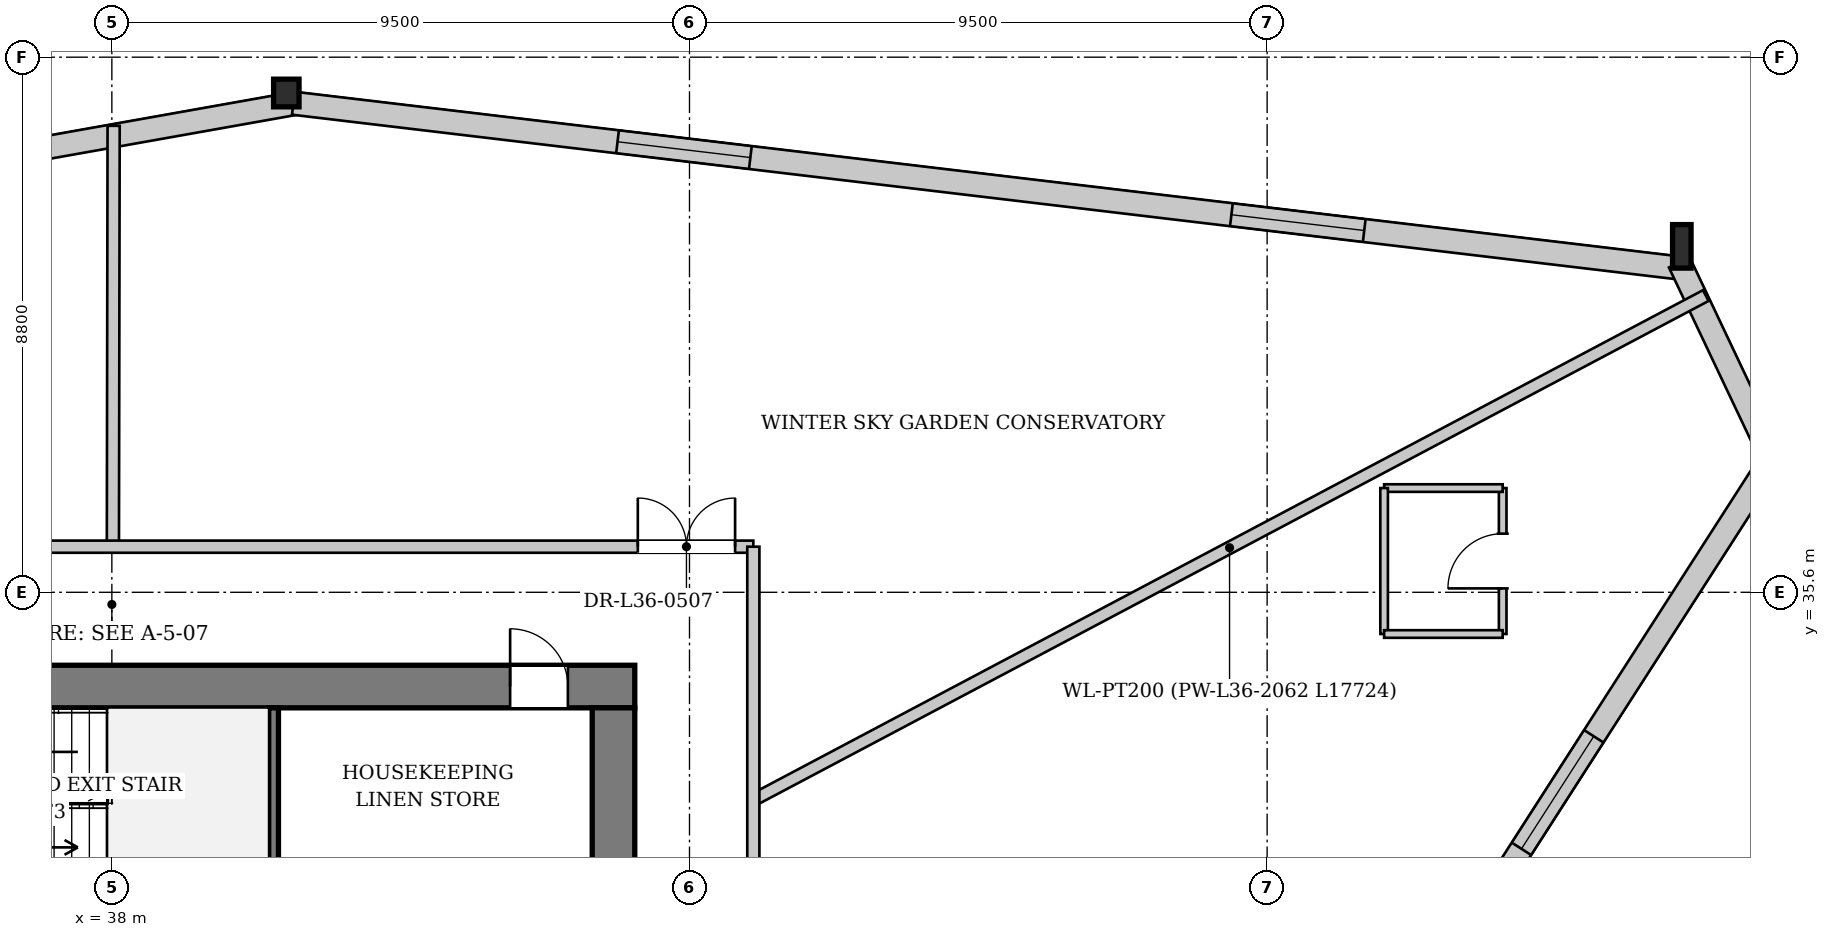
"""IFC4 building model, lengths in metres.
Left out: names, types, materials, properties, quantities, classifications, styles, units other than length and angle.
Written with IfcOpenShell. Run it as: python <this file> out.ifc"""

import sys

from ifc_helpers import new_model, si_unit, direction, frame, frame_2d, origin, origin_2d, place, context, subcontext, project, spatial, rectangle, i_section, extrude, source, transform, mapped, element, fill, save


model = new_model("IFC4")
c1 = context("Model", 3, precision=1e-05, world=origin(), true_north=direction((0.0, 1.0)))
c2 = subcontext(c1, "Body", "Model", "MODEL_VIEW")
j1 = project(units=[si_unit("LENGTHUNIT", "METRE"), si_unit("PLANEANGLEUNIT", "RADIAN")], contexts=[c1])
p1 = place(None, origin())
s1 = spatial("IfcSite", under=j1, at=p1, CompositionType="ELEMENT")
p2 = place(p1, origin())
s2 = spatial("IfcBuilding", under=s1, at=p2, CompositionType="ELEMENT")
p3 = place(p2, frame((0.0, 0.0, 138.1)))
s3 = spatial("IfcBuildingStorey", under=s2, at=p3, CompositionType="ELEMENT", Elevation=138.1)
m1 = source(origin(), c2, "Body", "SweptSolid", [
    extrude(i_section(OverallWidth=0.304, OverallDepth=0.716, WebThickness=0.021, FlangeThickness=0.04, at=origin_2d()), origin(), (0.0, 0.0, 1.0), 3.862),
])
p4 = place(p3, frame((63.951, 41.104, 0.0), z_axis=(-0.067901574351, 0.09553005479, 0.993107942186), x_axis=(-0.815079857812, -0.579348621634, 0.0)))
e1 = element("IfcColumn", 1, at=p4, inside=s3, PredefinedType="COLUMN", context=c2, shape_type="MappedRepresentation", body=[
    mapped(m1, transform((0.0, 0.0, 0.0), x_axis=(1.0, 0.0, 0.0), y_axis=(0.0, 1.0, 0.0), z_axis=(0.0, 0.0, 1.0), scale=1.0)),
])
m2 = source(origin(), c2, "Body", "SweptSolid", [
    extrude(i_section(OverallWidth=0.418, OverallDepth=0.455, WebThickness=0.038, FlangeThickness=0.059, at=origin_2d()), origin(), (0.0, 0.0, 1.0), 3.845),
])
p5 = place(p3, frame((41.007, 43.832, 0.0), z_axis=(-0.071811479916, -0.010730451022, 0.997360500909), x_axis=(0.147784535061, -0.989019580795, 0.0)))
e2 = element("IfcColumn", 2, at=p5, inside=s3, PredefinedType="COLUMN", context=c2, shape_type="MappedRepresentation", body=[
    mapped(m2, transform((0.0, 0.0, 0.0), x_axis=(1.0, 0.0, 0.0), y_axis=(0.0, 1.0, 0.0), z_axis=(0.0, 0.0, 1.0), scale=1.0)),
])
p6 = place(p3, frame((18.292, 39.598, 0.0), z_axis=(0.0, 0.0, 1.0), x_axis=(0.98454939434, 0.175107081823, 0.0)))
e3 = element("IfcWall", 3, at=p6, inside=s3, PredefinedType="SOLIDWALL", context=c2, shape_type="SweptSolid", body=[
    extrude(rectangle(XDim=23.105, YDim=0.38, at=frame_2d((11.553, 0.0))), origin(), (0.0, 0.0, 1.0), 2.972),
])
p7 = place(p6, frame((5.369, 0.0, 0.602)))
e4 = element("IfcOpeningElement", 4, at=p7, cuts=e3, PredefinedType="OPENING", context=c2, shape_type="SweptSolid", body=[
    extrude(rectangle(XDim=2.2, YDim=2.25, at=frame_2d((1.1, 1.125))), frame((0.0, 0.2, 0.0), z_axis=(0.0, -1.0, 0.0), x_axis=(1.0, 0.0, 0.0)), (0.0, 0.0, 1.0), 0.4),
])
p8 = place(p6, frame((15.536, 0.0, 0.602)))
e5 = element("IfcOpeningElement", 5, at=p8, cuts=e3, PredefinedType="OPENING", context=c2, shape_type="SweptSolid", body=[
    extrude(rectangle(XDim=2.2, YDim=2.25, at=frame_2d((1.1, 1.125))), frame((0.0, 0.2, 0.0), z_axis=(0.0, -1.0, 0.0), x_axis=(1.0, 0.0, 0.0)), (0.0, 0.0, 1.0), 0.4),
])
p9 = place(p3, frame((40.985, 43.643, 0.0), z_axis=(0.0, 0.0, 1.0), x_axis=(0.99301149666, -0.118017657578, 0.0)))
e6 = element("IfcWall", 6, at=p9, inside=s3, PredefinedType="SOLIDWALL", context=c2, shape_type="SweptSolid", body=[
    extrude(rectangle(XDim=23.105, YDim=0.38, at=frame_2d((11.552, 0.0))), origin(), (0.0, 0.0, 1.0), 2.972),
])
p10 = place(p9, frame((5.369, 0.0, 0.602)))
e7 = element("IfcOpeningElement", 7, at=p10, cuts=e6, PredefinedType="OPENING", context=c2, shape_type="SweptSolid", body=[
    extrude(rectangle(XDim=2.2, YDim=2.25, at=frame_2d((1.1, 1.125))), frame((0.0, 0.2, 0.0), z_axis=(0.0, -1.0, 0.0), x_axis=(1.0, 0.0, 0.0)), (0.0, 0.0, 1.0), 0.4),
])
p11 = place(p9, frame((15.536, 0.0, 0.602)))
e8 = element("IfcOpeningElement", 8, at=p11, cuts=e6, PredefinedType="OPENING", context=c2, shape_type="SweptSolid", body=[
    extrude(rectangle(XDim=2.2, YDim=2.25, at=frame_2d((1.1, 1.125))), frame((0.0, 0.2, 0.0), z_axis=(0.0, -1.0, 0.0), x_axis=(1.0, 0.0, 0.0)), (0.0, 0.0, 1.0), 0.4),
])
p12 = place(p3, frame((63.779, 41.023, 0.0), z_axis=(0.0, 0.0, 1.0), x_axis=(0.428160614976, -0.903702654518, 0.0)))
e9 = element("IfcWall", 9, at=p12, inside=s3, PredefinedType="SOLIDWALL", context=c2, shape_type="SweptSolid", body=[
    extrude(rectangle(XDim=3.674, YDim=0.38, at=frame_2d((1.837, 0.0))), origin(), (0.0, 0.0, 1.0), 2.972),
])
p13 = place(p3, frame((65.364, 37.887, 0.0), z_axis=(0.0, 0.0, 1.0), x_axis=(-0.540678429376, -0.84122935993, 0.0)))
e10 = element("IfcWall", 10, at=p13, inside=s3, PredefinedType="SOLIDWALL", context=c2, shape_type="SweptSolid", body=[
    extrude(rectangle(XDim=23.693, YDim=0.38, at=frame_2d((11.847, 0.0))), origin(), (0.0, 0.0, 1.0), 2.972),
])
p14 = place(p13, frame((5.534, 0.0, 0.602)))
e11 = element("IfcOpeningElement", 11, at=p14, cuts=e10, PredefinedType="OPENING", context=c2, shape_type="SweptSolid", body=[
    extrude(rectangle(XDim=2.2, YDim=2.25, at=frame_2d((1.1, 1.125))), frame((0.0, 0.2, 0.0), z_axis=(0.0, -1.0, 0.0), x_axis=(1.0, 0.0, 0.0)), (0.0, 0.0, 1.0), 0.4),
])
p15 = place(p13, frame((17.559, 0.0, 0.602)))
e12 = element("IfcOpeningElement", 12, at=p15, cuts=e10, PredefinedType="OPENING", context=c2, shape_type="SweptSolid", body=[
    extrude(rectangle(XDim=2.2, YDim=2.25, at=frame_2d((1.1, 1.125))), frame((0.0, 0.2, 0.0), z_axis=(0.0, -1.0, 0.0), x_axis=(1.0, 0.0, 0.0)), (0.0, 0.0, 1.0), 0.4),
])
p16 = place(p3, frame((29.4, 34.05, 0.0), z_axis=(0.0, 0.0, 1.0), x_axis=(1.0, 0.0, 0.0)))
e13 = element("IfcWall", 13, at=p16, inside=s3, PredefinedType="SHEAR", context=c2, shape_type="SweptSolid", body=[
    extrude(rectangle(XDim=17.2, YDim=0.7, at=frame_2d((8.6, 0.0))), origin(), (0.0, 0.0, 1.0), 3.58),
])
p17 = place(p16, frame((1.7, 0.0, 0.0)))
e14 = element("IfcOpeningElement", 14, at=p17, cuts=e13, PredefinedType="OPENING", context=c2, shape_type="SweptSolid", body=[
    extrude(rectangle(XDim=0.95, YDim=2.1, at=frame_2d((0.475, 1.05))), frame((0.0, 0.36, 0.0), z_axis=(0.0, -1.0, 0.0), x_axis=(1.0, 0.0, 0.0)), (0.0, 0.0, 1.0), 0.72),
])
p18 = place(p16, frame((4.08, 0.0, 0.0)))
e15 = element("IfcOpeningElement", 15, at=p18, cuts=e13, PredefinedType="OPENING", context=c2, shape_type="SweptSolid", body=[
    extrude(rectangle(XDim=1.32, YDim=2.2, at=frame_2d((0.66, 1.1))), frame((0.0, 0.36, 0.0), z_axis=(0.0, -1.0, 0.0), x_axis=(1.0, 0.0, 0.0)), (0.0, 0.0, 1.0), 0.72),
])
p19 = place(p16, frame((15.15, 0.0, 0.0)))
e16 = element("IfcOpeningElement", 16, at=p19, cuts=e13, PredefinedType="OPENING", context=c2, shape_type="SweptSolid", body=[
    extrude(rectangle(XDim=0.95, YDim=2.1, at=frame_2d((0.475, 1.05))), frame((0.0, 0.36, 0.0), z_axis=(0.0, -1.0, 0.0), x_axis=(1.0, 0.0, 0.0)), (0.0, 0.0, 1.0), 0.72),
])
p20 = place(p3, frame((46.25, 33.7, 0.0), z_axis=(0.0, 0.0, 1.0), x_axis=(0.0, -1.0, 0.0)))
e17 = element("IfcWall", 17, at=p20, inside=s3, PredefinedType="SHEAR", context=c2, shape_type="SweptSolid", body=[
    extrude(rectangle(XDim=14.2, YDim=0.7, at=frame_2d((7.1, 0.0))), origin(), (0.0, 0.0, 1.0), 3.58),
])
p21 = place(p20, frame((5.18, 0.0, 0.0)))
e18 = element("IfcOpeningElement", 18, at=p21, cuts=e17, PredefinedType="OPENING", context=c2, shape_type="SweptSolid", body=[
    extrude(rectangle(XDim=1.6, YDim=2.2, at=frame_2d((0.8, 1.1))), frame((0.0, 0.36, 0.0), z_axis=(0.0, -1.0, 0.0), x_axis=(1.0, 0.0, 0.0)), (0.0, 0.0, 1.0), 0.72),
])
p22 = place(p3, frame((40.66, 30.6, 0.0), z_axis=(0.0, 0.0, 1.0), x_axis=(0.0, 1.0, 0.0)))
e19 = element("IfcWall", 19, at=p22, inside=s3, PredefinedType="PARTITIONING", context=c2, shape_type="SweptSolid", body=[
    extrude(rectangle(XDim=3.1, YDim=0.16, at=frame_2d((1.55, 0.0))), origin(), (0.0, 0.0, 1.0), 3.58),
])
p23 = place(p3, frame((48.55, 32.186, 0.0), z_axis=(0.0, 0.0, 1.0), x_axis=(0.883765466782, 0.467930122694, 0.0)))
e20 = element("IfcWall", 20, at=p23, inside=s3, PredefinedType="PARTITIONING", context=c2, shape_type="SweptSolid", body=[
    extrude(rectangle(XDim=17.724, YDim=0.2, at=frame_2d((8.862, 0.0))), origin(), (0.0, 0.0, 1.0), 3.58),
])
p24 = place(p3, frame((38.017, 36.35, 0.0), z_axis=(0.0, 0.0, 1.0), x_axis=(0.001728453448, 0.999998506223, 0.0)))
e21 = element("IfcWall", 21, at=p24, inside=s3, PredefinedType="PARTITIONING", context=c2, shape_type="SweptSolid", body=[
    extrude(rectangle(XDim=6.921, YDim=0.2, at=frame_2d((3.46, 0.0))), origin(), (0.0, 0.0, 1.0), 3.58),
])
p25 = place(p3, frame((60.874, 34.914, 0.0), z_axis=(0.0, 0.0, 1.0), x_axis=(0.0, 1.0, 0.0)))
e22 = element("IfcWall", 22, at=p25, inside=s3, PredefinedType="PARTITIONING", context=c2, shape_type="SweptSolid", body=[
    extrude(rectangle(XDim=2.4, YDim=0.125, at=frame_2d((1.2, 0.0))), origin(), (0.0, 0.0, 1.0), 3.58),
])
p26 = place(p25, frame((0.75, 0.0, 0.0)))
e23 = element("IfcOpeningElement", 23, at=p26, cuts=e22, PredefinedType="OPENING", context=c2, shape_type="SweptSolid", body=[
    extrude(rectangle(XDim=0.9, YDim=2.1, at=frame_2d((0.45, 1.05))), frame((0.0, 0.073, 0.0), z_axis=(0.0, -1.0, 0.0), x_axis=(1.0, 0.0, 0.0)), (0.0, 0.0, 1.0), 0.145),
])
p27 = place(p3, frame((60.874, 37.314, 0.0), z_axis=(0.0, 0.0, 1.0), x_axis=(-1.0, 0.0, 0.0)))
e24 = element("IfcWall", 24, at=p27, inside=s3, PredefinedType="PARTITIONING", context=c2, shape_type="SweptSolid", body=[
    extrude(rectangle(XDim=1.95, YDim=0.125, at=frame_2d((0.975, 0.0))), origin(), (0.0, 0.0, 1.0), 3.58),
])
p28 = place(p3, frame((58.924, 37.314, 0.0), z_axis=(0.0, 0.0, 1.0), x_axis=(0.0, -1.0, 0.0)))
e25 = element("IfcWall", 25, at=p28, inside=s3, PredefinedType="PARTITIONING", context=c2, shape_type="SweptSolid", body=[
    extrude(rectangle(XDim=2.4, YDim=0.125, at=frame_2d((1.2, 0.0))), origin(), (0.0, 0.0, 1.0), 3.58),
])
p29 = place(p3, frame((58.924, 34.914, 0.0), z_axis=(0.0, 0.0, 1.0), x_axis=(1.0, 0.0, 0.0)))
e26 = element("IfcWall", 26, at=p29, inside=s3, PredefinedType="PARTITIONING", context=c2, shape_type="SweptSolid", body=[
    extrude(rectangle(XDim=1.95, YDim=0.125, at=frame_2d((0.975, 0.0))), origin(), (0.0, 0.0, 1.0), 3.58),
])
p30 = place(p3, frame((27.45, 36.35, 0.0), z_axis=(0.0, 0.0, 1.0), x_axis=(1.0, 0.0, 0.0)))
e27 = element("IfcWall", 27, at=p30, inside=s3, PredefinedType="PARTITIONING", context=c2, shape_type="SweptSolid", body=[
    extrude(rectangle(XDim=21.1, YDim=0.2, at=frame_2d((10.55, 0.0))), origin(), (0.0, 0.0, 1.0), 3.58),
])
p31 = place(p30, frame((19.2, 0.0, 0.0)))
e28 = element("IfcOpeningElement", 28, at=p31, cuts=e27, PredefinedType="OPENING", context=c2, shape_type="SweptSolid", body=[
    extrude(rectangle(XDim=1.6, YDim=2.2, at=frame_2d((0.8, 1.1))), frame((0.0, 0.11, 0.0), z_axis=(0.0, -1.0, 0.0), x_axis=(1.0, 0.0, 0.0)), (0.0, 0.0, 1.0), 0.22),
])
p32 = place(p3, frame((48.55, 16.85, 0.0), z_axis=(0.0, 0.0, 1.0), x_axis=(0.0, 1.0, 0.0)))
e29 = element("IfcWall", 29, at=p32, inside=s3, PredefinedType="PARTITIONING", context=c2, shape_type="SweptSolid", body=[
    extrude(rectangle(XDim=19.5, YDim=0.2, at=frame_2d((9.75, 0.0))), origin(), (0.0, 0.0, 1.0), 3.58),
])
p33 = place(p32, frame((11.322, 0.0, 0.0)))
e30 = element("IfcOpeningElement", 30, at=p33, cuts=e29, PredefinedType="OPENING", context=c2, shape_type="SweptSolid", body=[
    extrude(rectangle(XDim=0.98, YDim=2.15, at=frame_2d((0.49, 1.075))), frame((0.0, 0.11, 0.0), z_axis=(0.0, -1.0, 0.0), x_axis=(1.0, 0.0, 0.0)), (0.0, 0.0, 1.0), 0.22),
])
m3 = source(origin(), c2, "Body", "SweptSolid", [
    extrude(rectangle(XDim=2.2, YDim=2.25, at=frame_2d((1.1, 1.125))), frame((0.0, 0.03, 0.0), z_axis=(0.0, -1.0, 0.0), x_axis=(1.0, 0.0, 0.0)), (0.0, 0.0, 1.0), 0.06),
])
p34 = place(p10, origin())
e31 = element("IfcWindow", 31, at=p34, inside=s3, PartitioningType="SINGLE_PANEL", PredefinedType="WINDOW", context=c2, shape_type="MappedRepresentation", body=[
    mapped(m3, transform((0.0, 0.0, 0.0), x_axis=(1.0, 0.0, 0.0), y_axis=(0.0, 1.0, 0.0), z_axis=(0.0, 0.0, 1.0), scale=1.0)),
])
fill(e7, e31)
p35 = place(p11, origin())
e32 = element("IfcWindow", 32, at=p35, inside=s3, PartitioningType="SINGLE_PANEL", PredefinedType="WINDOW", context=c2, shape_type="MappedRepresentation", body=[
    mapped(m3, transform((0.0, 0.0, 0.0), x_axis=(1.0, 0.0, 0.0), y_axis=(0.0, 1.0, 0.0), z_axis=(0.0, 0.0, 1.0), scale=1.0)),
])
fill(e8, e32)
p36 = place(p14, origin())
e33 = element("IfcWindow", 33, at=p36, inside=s3, PartitioningType="SINGLE_PANEL", PredefinedType="WINDOW", context=c2, shape_type="MappedRepresentation", body=[
    mapped(m3, transform((0.0, 0.0, 0.0), x_axis=(1.0, 0.0, 0.0), y_axis=(0.0, 1.0, 0.0), z_axis=(0.0, 0.0, 1.0), scale=1.0)),
])
fill(e11, e33)
m4 = source(origin(), c2, "Body", "SweptSolid", [
    extrude(rectangle(XDim=0.95, YDim=2.1, at=frame_2d((0.475, 1.05))), frame((0.0, 0.025, 0.0), z_axis=(0.0, -1.0, 0.0), x_axis=(1.0, 0.0, 0.0)), (0.0, 0.0, 1.0), 0.05),
])
p37 = place(p19, origin())
e34 = element("IfcDoor", 34, at=p37, inside=s3, OperationType="SINGLE_SWING_LEFT", PredefinedType="DOOR", context=c2, shape_type="MappedRepresentation", body=[
    mapped(m4, transform((0.0, 0.0, 0.0), x_axis=(1.0, 0.0, 0.0), y_axis=(0.0, 1.0, 0.0), z_axis=(0.0, 0.0, 1.0), scale=1.0)),
])
fill(e16, e34)
m5 = source(origin(), c2, "Body", "SweptSolid", [
    extrude(rectangle(XDim=0.9, YDim=2.1, at=frame_2d((0.45, 1.05))), frame((0.0, 0.025, 0.0), z_axis=(0.0, -1.0, 0.0), x_axis=(1.0, 0.0, 0.0)), (0.0, 0.0, 1.0), 0.05),
])
p38 = place(p26, origin())
e35 = element("IfcDoor", 35, at=p38, inside=s3, OperationType="SINGLE_SWING_LEFT", PredefinedType="DOOR", context=c2, shape_type="MappedRepresentation", body=[
    mapped(m5, transform((0.0, 0.0, 0.0), x_axis=(1.0, 0.0, 0.0), y_axis=(0.0, 1.0, 0.0), z_axis=(0.0, 0.0, 1.0), scale=1.0)),
])
fill(e23, e35)
m6 = source(origin(), c2, "Body", "SweptSolid", [
    extrude(rectangle(XDim=1.6, YDim=2.2, at=frame_2d((0.8, 1.1))), frame((0.0, 0.025, 0.0), z_axis=(0.0, -1.0, 0.0), x_axis=(1.0, 0.0, 0.0)), (0.0, 0.0, 1.0), 0.05),
])
p39 = place(p31, origin())
e36 = element("IfcDoor", 36, at=p39, inside=s3, OperationType="DOUBLE_DOOR_SINGLE_SWING", PredefinedType="DOOR", context=c2, shape_type="MappedRepresentation", body=[
    mapped(m6, transform((0.0, 0.0, 0.0), x_axis=(1.0, 0.0, 0.0), y_axis=(0.0, 1.0, 0.0), z_axis=(0.0, 0.0, 1.0), scale=1.0)),
])
fill(e28, e36)
save(model, sys.argv[1])
